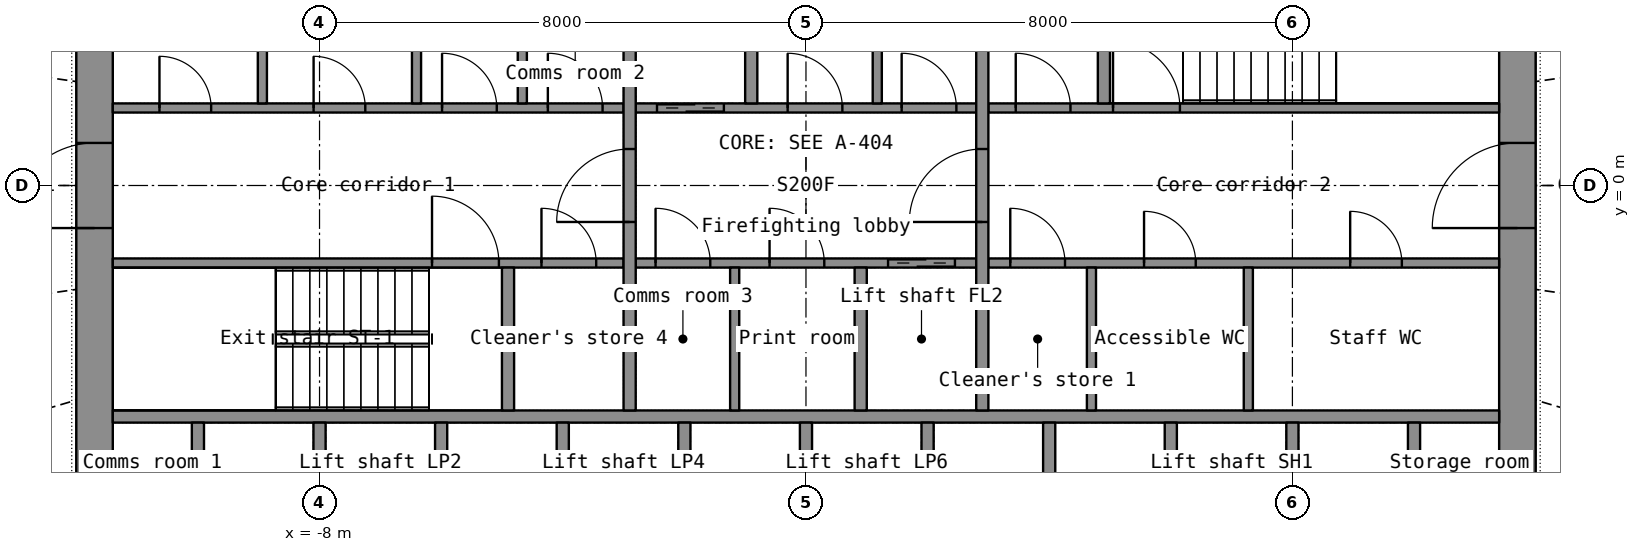
"""IFC4 building model, lengths in metres.
Left out: names, types, materials, properties, quantities, classifications, styles, units other than length and angle.
Written with IfcOpenShell. Run it as: python <this file> out.ifc"""

import sys

from ifc_helpers import new_model, si_unit, direction, frame, frame_2d, origin, place, context, subcontext, project, spatial, rectangle, extrude, element, fill, save


model = new_model("IFC4")
c1 = context("Model", 3, precision=1e-05, world=origin(), true_north=direction((0.0, 1.0)))
c2 = subcontext(c1, "Body", "Model", "MODEL_VIEW")
j1 = project(units=[si_unit("LENGTHUNIT", "METRE"), si_unit("PLANEANGLEUNIT", "RADIAN")], contexts=[c1])
p1 = place(None, origin())
s1 = spatial("IfcSite", under=j1, at=p1, CompositionType="ELEMENT")
p2 = place(p1, origin())
s2 = spatial("IfcBuilding", under=s1, at=p2, CompositionType="ELEMENT")
p3 = place(p2, frame((0.0, 0.0, 13.5)))
s3 = spatial("IfcBuildingStorey", under=s2, at=p3, CompositionType="ELEMENT", Elevation=13.5)
p4 = place(p3, frame((-11.7, -7.2, 0.0), z_axis=(0.0, 0.0, 1.0), x_axis=(0.0, 1.0, 0.0)))
e1 = element("IfcWall", 1, at=p4, inside=s3, PredefinedType="SHEAR", context=c2, shape_type="SweptSolid", body=[
    extrude(rectangle(XDim=14.4, YDim=0.6, at=frame_2d((7.2, 0.0))), origin(), (0.0, 0.0, 1.0), 6.1),
])
p5 = place(p4, frame((6.5, 0.0, 0.0)))
e2 = element("IfcOpeningElement", 2, at=p5, cuts=e1, PredefinedType="OPENING", context=c2, shape_type="SweptSolid", body=[
    extrude(rectangle(XDim=1.4, YDim=2.2, at=frame_2d((0.7, 1.1))), frame((0.0, 0.31, 0.0), z_axis=(0.0, -1.0, 0.0), x_axis=(1.0, 0.0, 0.0)), (0.0, 0.0, 1.0), 0.62),
])
p6 = place(p3, frame((11.7, -7.2, 0.0), z_axis=(0.0, 0.0, 1.0), x_axis=(0.0, 1.0, 0.0)))
e3 = element("IfcWall", 3, at=p6, inside=s3, PredefinedType="SHEAR", context=c2, shape_type="SweptSolid", body=[
    extrude(rectangle(XDim=14.4, YDim=0.6, at=frame_2d((7.2, 0.0))), origin(), (0.0, 0.0, 1.0), 6.1),
])
p7 = place(p6, frame((6.5, 0.0, 0.0)))
e4 = element("IfcOpeningElement", 4, at=p7, cuts=e3, PredefinedType="OPENING", context=c2, shape_type="SweptSolid", body=[
    extrude(rectangle(XDim=1.4, YDim=2.2, at=frame_2d((0.7, 1.1))), frame((0.0, 0.31, 0.0), z_axis=(0.0, -1.0, 0.0), x_axis=(1.0, 0.0, 0.0)), (0.0, 0.0, 1.0), 0.62),
])
p8 = place(p3, frame((-11.4, -3.8, 0.0), z_axis=(0.0, 0.0, 1.0), x_axis=(1.0, 0.0, 0.0)))
e5 = element("IfcWall", 5, at=p8, inside=s3, PredefinedType="SHEAR", context=c2, shape_type="SweptSolid", body=[
    extrude(rectangle(XDim=22.8, YDim=0.2, at=frame_2d((11.4, 0.0))), origin(), (0.0, 0.0, 1.0), 6.1),
])
for number, where, z_axis, x_axis in (
    (6, (-10.0, -6.6, 0.0), (0.0, 0.0, 1.0), (0.0, 1.0, 0.0)),
    (7, (-8.0, -6.6, 0.0), (0.0, 0.0, 1.0), (0.0, 1.0, 0.0)),
    (8, (-6.0, -6.6, 0.0), (0.0, 0.0, 1.0), (0.0, 1.0, 0.0)),
    (9, (-4.0, -6.6, 0.0), (0.0, 0.0, 1.0), (0.0, 1.0, 0.0)),
    (10, (-2.0, -6.6, 0.0), (0.0, 0.0, 1.0), (0.0, 1.0, 0.0)),
    (11, (0.0, -6.6, 0.0), (0.0, 0.0, 1.0), (0.0, 1.0, 0.0)),
    (12, (2.0, -6.6, 0.0), (0.0, 0.0, 1.0), (0.0, 1.0, 0.0)),
    (13, (4.0, -6.6, 0.0), (0.0, 0.0, 1.0), (0.0, 1.0, 0.0)),
    (14, (6.0, -6.6, 0.0), (0.0, 0.0, 1.0), (0.0, 1.0, 0.0)),
    (15, (8.0, -6.6, 0.0), (0.0, 0.0, 1.0), (0.0, 1.0, 0.0)),
    (16, (10.0, -6.6, 0.0), (0.0, 0.0, 1.0), (0.0, 1.0, 0.0)),
):
    element("IfcWall", number, at=place(p3, frame(where, z_axis=z_axis, x_axis=x_axis)), inside=s3, PredefinedType="SHEAR", context=c2, shape_type="SweptSolid", body=[
        extrude(rectangle(XDim=2.7, YDim=0.2, at=frame_2d((1.35, 0.0))), origin(), (0.0, 0.0, 1.0), 6.1),
    ])
p9 = place(p3, frame((-11.4, -1.275, 0.0), z_axis=(0.0, 0.0, 1.0), x_axis=(1.0, 0.0, 0.0)))
e17 = element("IfcWall", 17, at=p9, inside=s3, PredefinedType="SHEAR", context=c2, shape_type="SweptSolid", body=[
    extrude(rectangle(XDim=8.4, YDim=0.15, at=frame_2d((4.2, 0.0))), origin(), (0.0, 0.0, 1.0), 6.1),
])
p10 = place(p9, frame((5.25, 0.0, 0.0)))
e18 = element("IfcOpeningElement", 18, at=p10, cuts=e17, PredefinedType="OPENING", context=c2, shape_type="SweptSolid", body=[
    extrude(rectangle(XDim=1.1, YDim=2.15, at=frame_2d((0.55, 1.075))), frame((0.0, 0.085, 0.0), z_axis=(0.0, -1.0, 0.0), x_axis=(1.0, 0.0, 0.0)), (0.0, 0.0, 1.0), 0.17),
])
p11 = place(p9, frame((7.05, 0.0, 0.0)))
e19 = element("IfcOpeningElement", 19, at=p11, cuts=e17, PredefinedType="OPENING", context=c2, shape_type="SweptSolid", body=[
    extrude(rectangle(XDim=0.9, YDim=2.1, at=frame_2d((0.45, 1.05))), frame((0.0, 0.085, 0.0), z_axis=(0.0, -1.0, 0.0), x_axis=(1.0, 0.0, 0.0)), (0.0, 0.0, 1.0), 0.17),
])
p12 = place(p3, frame((-2.8, -1.275, 0.0), z_axis=(0.0, 0.0, 1.0), x_axis=(1.0, 0.0, 0.0)))
e20 = element("IfcWall", 20, at=p12, inside=s3, PredefinedType="SHEAR", context=c2, shape_type="SweptSolid", body=[
    extrude(rectangle(XDim=5.6, YDim=0.15, at=frame_2d((2.8, 0.0))), origin(), (0.0, 0.0, 1.0), 6.1),
])
p13 = place(p12, frame((4.15, 0.0, 0.0)))
e21 = element("IfcOpeningElement", 21, at=p13, cuts=e20, PredefinedType="OPENING", context=c2, shape_type="SweptSolid", body=[
    extrude(rectangle(XDim=1.1, YDim=2.2, at=frame_2d((0.55, 1.1))), frame((0.0, 0.085, 0.0), z_axis=(0.0, -1.0, 0.0), x_axis=(1.0, 0.0, 0.0)), (0.0, 0.0, 1.0), 0.17),
])
p14 = place(p12, frame((0.326, 0.0, 0.0)))
e22 = element("IfcOpeningElement", 22, at=p14, cuts=e20, PredefinedType="OPENING", context=c2, shape_type="SweptSolid", body=[
    extrude(rectangle(XDim=0.9, YDim=2.1, at=frame_2d((0.45, 1.05))), frame((0.0, 0.085, 0.0), z_axis=(0.0, -1.0, 0.0), x_axis=(1.0, 0.0, 0.0)), (0.0, 0.0, 1.0), 0.17),
])
p15 = place(p12, frame((2.201, 0.0, 0.0)))
e23 = element("IfcOpeningElement", 23, at=p15, cuts=e20, PredefinedType="OPENING", context=c2, shape_type="SweptSolid", body=[
    extrude(rectangle(XDim=0.9, YDim=2.1, at=frame_2d((0.45, 1.05))), frame((0.0, 0.085, 0.0), z_axis=(0.0, -1.0, 0.0), x_axis=(1.0, 0.0, 0.0)), (0.0, 0.0, 1.0), 0.17),
])
p16 = place(p3, frame((3.0, -1.275, 0.0), z_axis=(0.0, 0.0, 1.0), x_axis=(1.0, 0.0, 0.0)))
e24 = element("IfcWall", 24, at=p16, inside=s3, PredefinedType="PARTITIONING", context=c2, shape_type="SweptSolid", body=[
    extrude(rectangle(XDim=8.4, YDim=0.15, at=frame_2d((4.2, 0.0))), origin(), (0.0, 0.0, 1.0), 6.1),
])
p17 = place(p16, frame((0.36, 0.0, 0.0)))
e25 = element("IfcOpeningElement", 25, at=p17, cuts=e24, PredefinedType="OPENING", context=c2, shape_type="SweptSolid", body=[
    extrude(rectangle(XDim=0.9, YDim=2.1, at=frame_2d((0.45, 1.05))), frame((0.0, 0.085, 0.0), z_axis=(0.0, -1.0, 0.0), x_axis=(1.0, 0.0, 0.0)), (0.0, 0.0, 1.0), 0.17),
])
p18 = place(p16, frame((2.56, 0.0, 0.0)))
e26 = element("IfcOpeningElement", 26, at=p18, cuts=e24, PredefinedType="OPENING", context=c2, shape_type="SweptSolid", body=[
    extrude(rectangle(XDim=0.85, YDim=2.1, at=frame_2d((0.425, 1.05))), frame((0.0, 0.085, 0.0), z_axis=(0.0, -1.0, 0.0), x_axis=(1.0, 0.0, 0.0)), (0.0, 0.0, 1.0), 0.17),
])
p19 = place(p16, frame((5.95, 0.0, 0.0)))
e27 = element("IfcOpeningElement", 27, at=p19, cuts=e24, PredefinedType="OPENING", context=c2, shape_type="SweptSolid", body=[
    extrude(rectangle(XDim=0.85, YDim=2.1, at=frame_2d((0.425, 1.05))), frame((0.0, 0.085, 0.0), z_axis=(0.0, -1.0, 0.0), x_axis=(1.0, 0.0, 0.0)), (0.0, 0.0, 1.0), 0.17),
])
p20 = place(p3, frame((-11.4, 1.275, 0.0), z_axis=(0.0, 0.0, 1.0), x_axis=(1.0, 0.0, 0.0)))
e28 = element("IfcWall", 28, at=p20, inside=s3, PredefinedType="PARTITIONING", context=c2, shape_type="SweptSolid", body=[
    extrude(rectangle(XDim=8.4, YDim=0.15, at=frame_2d((4.2, 0.0))), origin(), (0.0, 0.0, 1.0), 6.1),
])
p21 = place(p20, frame((0.768, 0.0, 0.0)))
e29 = element("IfcOpeningElement", 29, at=p21, cuts=e28, PredefinedType="OPENING", context=c2, shape_type="SweptSolid", body=[
    extrude(rectangle(XDim=0.85, YDim=2.1, at=frame_2d((0.425, 1.05))), frame((0.0, 0.085, 0.0), z_axis=(0.0, -1.0, 0.0), x_axis=(1.0, 0.0, 0.0)), (0.0, 0.0, 1.0), 0.17),
])
p22 = place(p20, frame((3.302, 0.0, 0.0)))
e30 = element("IfcOpeningElement", 30, at=p22, cuts=e28, PredefinedType="OPENING", context=c2, shape_type="SweptSolid", body=[
    extrude(rectangle(XDim=0.85, YDim=2.1, at=frame_2d((0.425, 1.05))), frame((0.0, 0.085, 0.0), z_axis=(0.0, -1.0, 0.0), x_axis=(1.0, 0.0, 0.0)), (0.0, 0.0, 1.0), 0.17),
])
p23 = place(p20, frame((5.415, 0.0, 0.0)))
e31 = element("IfcOpeningElement", 31, at=p23, cuts=e28, PredefinedType="OPENING", context=c2, shape_type="SweptSolid", body=[
    extrude(rectangle(XDim=0.9, YDim=2.1, at=frame_2d((0.45, 1.05))), frame((0.0, 0.085, 0.0), z_axis=(0.0, -1.0, 0.0), x_axis=(1.0, 0.0, 0.0)), (0.0, 0.0, 1.0), 0.17),
])
p24 = place(p20, frame((7.155, 0.0, 0.0)))
e32 = element("IfcOpeningElement", 32, at=p24, cuts=e28, PredefinedType="OPENING", context=c2, shape_type="SweptSolid", body=[
    extrude(rectangle(XDim=0.9, YDim=2.1, at=frame_2d((0.45, 1.05))), frame((0.0, 0.085, 0.0), z_axis=(0.0, -1.0, 0.0), x_axis=(1.0, 0.0, 0.0)), (0.0, 0.0, 1.0), 0.17),
])
p25 = place(p3, frame((-2.8, 1.275, 0.0), z_axis=(0.0, 0.0, 1.0), x_axis=(1.0, 0.0, 0.0)))
e33 = element("IfcWall", 33, at=p25, inside=s3, PredefinedType="SHEAR", context=c2, shape_type="SweptSolid", body=[
    extrude(rectangle(XDim=5.6, YDim=0.15, at=frame_2d((2.8, 0.0))), origin(), (0.0, 0.0, 1.0), 6.1),
])
p26 = place(p25, frame((0.35, 0.0, 0.0)))
e34 = element("IfcOpeningElement", 34, at=p26, cuts=e33, PredefinedType="OPENING", context=c2, shape_type="SweptSolid", body=[
    extrude(rectangle(XDim=1.1, YDim=2.2, at=frame_2d((0.55, 1.1))), frame((0.0, 0.085, 0.0), z_axis=(0.0, -1.0, 0.0), x_axis=(1.0, 0.0, 0.0)), (0.0, 0.0, 1.0), 0.17),
])
p27 = place(p25, frame((2.499, 0.0, 0.0)))
e35 = element("IfcOpeningElement", 35, at=p27, cuts=e33, PredefinedType="OPENING", context=c2, shape_type="SweptSolid", body=[
    extrude(rectangle(XDim=0.9, YDim=2.1, at=frame_2d((0.45, 1.05))), frame((0.0, 0.085, 0.0), z_axis=(0.0, -1.0, 0.0), x_axis=(1.0, 0.0, 0.0)), (0.0, 0.0, 1.0), 0.17),
])
p28 = place(p25, frame((4.374, 0.0, 0.0)))
e36 = element("IfcOpeningElement", 36, at=p28, cuts=e33, PredefinedType="OPENING", context=c2, shape_type="SweptSolid", body=[
    extrude(rectangle(XDim=0.9, YDim=2.1, at=frame_2d((0.45, 1.05))), frame((0.0, 0.085, 0.0), z_axis=(0.0, -1.0, 0.0), x_axis=(1.0, 0.0, 0.0)), (0.0, 0.0, 1.0), 0.17),
])
p29 = place(p3, frame((3.0, 1.275, 0.0), z_axis=(0.0, 0.0, 1.0), x_axis=(1.0, 0.0, 0.0)))
e37 = element("IfcWall", 37, at=p29, inside=s3, PredefinedType="SHEAR", context=c2, shape_type="SweptSolid", body=[
    extrude(rectangle(XDim=8.4, YDim=0.15, at=frame_2d((4.2, 0.0))), origin(), (0.0, 0.0, 1.0), 6.1),
])
p30 = place(p29, frame((2.05, 0.0, 0.0)))
e38 = element("IfcOpeningElement", 38, at=p30, cuts=e37, PredefinedType="OPENING", context=c2, shape_type="SweptSolid", body=[
    extrude(rectangle(XDim=1.1, YDim=2.15, at=frame_2d((0.55, 1.075))), frame((0.0, 0.085, 0.0), z_axis=(0.0, -1.0, 0.0), x_axis=(1.0, 0.0, 0.0)), (0.0, 0.0, 1.0), 0.17),
])
p31 = place(p29, frame((0.45, 0.0, 0.0)))
e39 = element("IfcOpeningElement", 39, at=p31, cuts=e37, PredefinedType="OPENING", context=c2, shape_type="SweptSolid", body=[
    extrude(rectangle(XDim=0.9, YDim=2.1, at=frame_2d((0.45, 1.05))), frame((0.0, 0.085, 0.0), z_axis=(0.0, -1.0, 0.0), x_axis=(1.0, 0.0, 0.0)), (0.0, 0.0, 1.0), 0.17),
])
p32 = place(p3, frame((-2.9, -3.7, 0.0), z_axis=(0.0, 0.0, 1.0), x_axis=(0.0, 1.0, 0.0)))
e40 = element("IfcWall", 40, at=p32, inside=s3, PredefinedType="SHEAR", context=c2, shape_type="SweptSolid", body=[
    extrude(rectangle(XDim=7.4, YDim=0.2, at=frame_2d((3.7, 0.0))), origin(), (0.0, 0.0, 1.0), 6.1),
])
p33 = place(p32, frame((3.1, 0.0, 0.0)))
e41 = element("IfcOpeningElement", 41, at=p33, cuts=e40, PredefinedType="OPENING", context=c2, shape_type="SweptSolid", body=[
    extrude(rectangle(XDim=1.2, YDim=2.2, at=frame_2d((0.6, 1.1))), frame((0.0, 0.11, 0.0), z_axis=(0.0, -1.0, 0.0), x_axis=(1.0, 0.0, 0.0)), (0.0, 0.0, 1.0), 0.22),
])
p34 = place(p3, frame((2.9, -3.7, 0.0), z_axis=(0.0, 0.0, 1.0), x_axis=(0.0, 1.0, 0.0)))
e42 = element("IfcWall", 42, at=p34, inside=s3, PredefinedType="SHEAR", context=c2, shape_type="SweptSolid", body=[
    extrude(rectangle(XDim=7.4, YDim=0.2, at=frame_2d((3.7, 0.0))), origin(), (0.0, 0.0, 1.0), 6.1),
])
p35 = place(p34, frame((3.1, 0.0, 0.0)))
e43 = element("IfcOpeningElement", 43, at=p35, cuts=e42, PredefinedType="OPENING", context=c2, shape_type="SweptSolid", body=[
    extrude(rectangle(XDim=1.2, YDim=2.2, at=frame_2d((0.6, 1.1))), frame((0.0, 0.11, 0.0), z_axis=(0.0, -1.0, 0.0), x_axis=(1.0, 0.0, 0.0)), (0.0, 0.0, 1.0), 0.22),
])
for number, where, z_axis, x_axis in (
    (44, (-0.9, 1.35, 0.0), (0.0, 0.0, 1.0), (0.0, 1.0, 0.0)),
    (45, (0.9, -3.7, 0.0), (0.0, 0.0, 1.0), (0.0, 1.0, 0.0)),
    (46, (-4.9, -3.7, 0.0), (0.0, 0.0, 1.0), (0.0, 1.0, 0.0)),
    (47, (4.9, 1.35, 0.0), (0.0, 0.0, 1.0), (0.0, 1.0, 0.0)),
):
    element("IfcWall", number, at=place(p3, frame(where, z_axis=z_axis, x_axis=x_axis)), inside=s3, PredefinedType="SHEAR", context=c2, shape_type="SweptSolid", body=[
        extrude(rectangle(XDim=2.35, YDim=0.2, at=frame_2d((1.175, 0.0))), origin(), (0.0, 0.0, 1.0), 6.1),
    ])
for number, where, z_axis, x_axis in (
    (48, (-8.94, 1.35, 0.0), (0.0, 0.0, 1.0), (0.0, 1.0, 0.0)),
    (49, (-6.405, 1.35, 0.0), (0.0, 0.0, 1.0), (0.0, 1.0, 0.0)),
    (50, (-4.665, 1.35, 0.0), (0.0, 0.0, 1.0), (0.0, 1.0, 0.0)),
    (51, (4.695, -3.7, 0.0), (0.0, 0.0, 1.0), (0.0, 1.0, 0.0)),
    (52, (7.275, -3.7, 0.0), (0.0, 0.0, 1.0), (0.0, 1.0, 0.0)),
    (53, (1.173, 1.35, 0.0), (0.0, 0.0, 1.0), (0.0, 1.0, 0.0)),
    (54, (-1.173, -3.7, 0.0), (0.0, 0.0, 1.0), (0.0, 1.0, 0.0)),
):
    element("IfcWall", number, at=place(p3, frame(where, z_axis=z_axis, x_axis=x_axis)), inside=s3, PredefinedType="PARTITIONING", context=c2, shape_type="SweptSolid", body=[
        extrude(rectangle(XDim=2.35, YDim=0.15, at=frame_2d((1.175, 0.0))), origin(), (0.0, 0.0, 1.0), 6.1),
    ])
p36 = place(p5, origin())
e55 = element("IfcDoor", 55, at=p36, inside=s3, OperationType="DOUBLE_DOOR_SINGLE_SWING", PredefinedType="DOOR", context=c2, shape_type="SweptSolid", body=[
    extrude(rectangle(XDim=1.4, YDim=2.2, at=frame_2d((0.7, 1.1))), frame((0.0, 0.025, 0.0), z_axis=(0.0, -1.0, 0.0), x_axis=(1.0, 0.0, 0.0)), (0.0, 0.0, 1.0), 0.05),
])
fill(e2, e55)
p37 = place(p7, origin())
e56 = element("IfcDoor", 56, at=p37, inside=s3, OperationType="DOUBLE_DOOR_SINGLE_SWING", PredefinedType="DOOR", context=c2, shape_type="SweptSolid", body=[
    extrude(rectangle(XDim=1.4, YDim=2.2, at=frame_2d((0.7, 1.1))), frame((0.0, 0.025, 0.0), z_axis=(0.0, -1.0, 0.0), x_axis=(1.0, 0.0, 0.0)), (0.0, 0.0, 1.0), 0.05),
])
fill(e4, e56)
p38 = place(p33, origin())
e57 = element("IfcDoor", 57, at=p38, inside=s3, OperationType="SINGLE_SWING_LEFT", PredefinedType="DOOR", context=c2, shape_type="SweptSolid", body=[
    extrude(rectangle(XDim=1.2, YDim=2.2, at=frame_2d((0.6, 1.1))), frame((0.0, 0.025, 0.0), z_axis=(0.0, -1.0, 0.0), x_axis=(1.0, 0.0, 0.0)), (0.0, 0.0, 1.0), 0.05),
])
fill(e41, e57)
p39 = place(p35, origin())
e58 = element("IfcDoor", 58, at=p39, inside=s3, OperationType="SINGLE_SWING_LEFT", PredefinedType="DOOR", context=c2, shape_type="SweptSolid", body=[
    extrude(rectangle(XDim=1.2, YDim=2.2, at=frame_2d((0.6, 1.1))), frame((0.0, 0.025, 0.0), z_axis=(0.0, -1.0, 0.0), x_axis=(1.0, 0.0, 0.0)), (0.0, 0.0, 1.0), 0.05),
])
fill(e43, e58)
p40 = place(p26, origin())
e59 = element("IfcDoor", 59, at=p40, inside=s3, OperationType="DOUBLE_DOOR_SLIDING", PredefinedType="DOOR", context=c2, shape_type="SweptSolid", body=[
    extrude(rectangle(XDim=1.1, YDim=2.2, at=frame_2d((0.55, 1.1))), frame((0.0, 0.025, 0.0), z_axis=(0.0, -1.0, 0.0), x_axis=(1.0, 0.0, 0.0)), (0.0, 0.0, 1.0), 0.05),
])
fill(e34, e59)
p41 = place(p13, origin())
e60 = element("IfcDoor", 60, at=p41, inside=s3, OperationType="DOUBLE_DOOR_SLIDING", PredefinedType="DOOR", context=c2, shape_type="SweptSolid", body=[
    extrude(rectangle(XDim=1.1, YDim=2.2, at=frame_2d((0.55, 1.1))), frame((0.0, 0.025, 0.0), z_axis=(0.0, -1.0, 0.0), x_axis=(1.0, 0.0, 0.0)), (0.0, 0.0, 1.0), 0.05),
])
fill(e21, e60)
p42 = place(p10, origin())
e61 = element("IfcDoor", 61, at=p42, inside=s3, OperationType="SINGLE_SWING_LEFT", PredefinedType="DOOR", context=c2, shape_type="SweptSolid", body=[
    extrude(rectangle(XDim=1.1, YDim=2.15, at=frame_2d((0.55, 1.075))), frame((0.0, 0.025, 0.0), z_axis=(0.0, -1.0, 0.0), x_axis=(1.0, 0.0, 0.0)), (0.0, 0.0, 1.0), 0.05),
])
fill(e18, e61)
p43 = place(p30, origin())
e62 = element("IfcDoor", 62, at=p43, inside=s3, OperationType="SINGLE_SWING_LEFT", PredefinedType="DOOR", context=c2, shape_type="SweptSolid", body=[
    extrude(rectangle(XDim=1.1, YDim=2.15, at=frame_2d((0.55, 1.075))), frame((0.0, 0.025, 0.0), z_axis=(0.0, -1.0, 0.0), x_axis=(1.0, 0.0, 0.0)), (0.0, 0.0, 1.0), 0.05),
])
fill(e38, e62)
p44 = place(p21, origin())
e63 = element("IfcDoor", 63, at=p44, inside=s3, OperationType="SINGLE_SWING_LEFT", PredefinedType="DOOR", context=c2, shape_type="SweptSolid", body=[
    extrude(rectangle(XDim=0.85, YDim=2.1, at=frame_2d((0.425, 1.05))), frame((0.0, 0.025, 0.0), z_axis=(0.0, -1.0, 0.0), x_axis=(1.0, 0.0, 0.0)), (0.0, 0.0, 1.0), 0.05),
])
fill(e29, e63)
p45 = place(p22, origin())
e64 = element("IfcDoor", 64, at=p45, inside=s3, OperationType="SINGLE_SWING_LEFT", PredefinedType="DOOR", context=c2, shape_type="SweptSolid", body=[
    extrude(rectangle(XDim=0.85, YDim=2.1, at=frame_2d((0.425, 1.05))), frame((0.0, 0.025, 0.0), z_axis=(0.0, -1.0, 0.0), x_axis=(1.0, 0.0, 0.0)), (0.0, 0.0, 1.0), 0.05),
])
fill(e30, e64)
p46 = place(p23, origin())
e65 = element("IfcDoor", 65, at=p46, inside=s3, OperationType="SINGLE_SWING_LEFT", PredefinedType="DOOR", context=c2, shape_type="SweptSolid", body=[
    extrude(rectangle(XDim=0.9, YDim=2.1, at=frame_2d((0.45, 1.05))), frame((0.0, 0.025, 0.0), z_axis=(0.0, -1.0, 0.0), x_axis=(1.0, 0.0, 0.0)), (0.0, 0.0, 1.0), 0.05),
])
fill(e31, e65)
p47 = place(p24, origin())
e66 = element("IfcDoor", 66, at=p47, inside=s3, OperationType="SINGLE_SWING_LEFT", PredefinedType="DOOR", context=c2, shape_type="SweptSolid", body=[
    extrude(rectangle(XDim=0.9, YDim=2.1, at=frame_2d((0.45, 1.05))), frame((0.0, 0.025, 0.0), z_axis=(0.0, -1.0, 0.0), x_axis=(1.0, 0.0, 0.0)), (0.0, 0.0, 1.0), 0.05),
])
fill(e32, e66)
p48 = place(p17, origin())
e67 = element("IfcDoor", 67, at=p48, inside=s3, OperationType="SINGLE_SWING_LEFT", PredefinedType="DOOR", context=c2, shape_type="SweptSolid", body=[
    extrude(rectangle(XDim=0.9, YDim=2.1, at=frame_2d((0.45, 1.05))), frame((0.0, 0.025, 0.0), z_axis=(0.0, -1.0, 0.0), x_axis=(1.0, 0.0, 0.0)), (0.0, 0.0, 1.0), 0.05),
])
fill(e25, e67)
p49 = place(p18, origin())
e68 = element("IfcDoor", 68, at=p49, inside=s3, OperationType="SINGLE_SWING_LEFT", PredefinedType="DOOR", context=c2, shape_type="SweptSolid", body=[
    extrude(rectangle(XDim=0.85, YDim=2.1, at=frame_2d((0.425, 1.05))), frame((0.0, 0.025, 0.0), z_axis=(0.0, -1.0, 0.0), x_axis=(1.0, 0.0, 0.0)), (0.0, 0.0, 1.0), 0.05),
])
fill(e26, e68)
p50 = place(p19, origin())
e69 = element("IfcDoor", 69, at=p50, inside=s3, OperationType="SINGLE_SWING_LEFT", PredefinedType="DOOR", context=c2, shape_type="SweptSolid", body=[
    extrude(rectangle(XDim=0.85, YDim=2.1, at=frame_2d((0.425, 1.05))), frame((0.0, 0.025, 0.0), z_axis=(0.0, -1.0, 0.0), x_axis=(1.0, 0.0, 0.0)), (0.0, 0.0, 1.0), 0.05),
])
fill(e27, e69)
p51 = place(p27, origin())
e70 = element("IfcDoor", 70, at=p51, inside=s3, OperationType="SINGLE_SWING_LEFT", PredefinedType="DOOR", context=c2, shape_type="SweptSolid", body=[
    extrude(rectangle(XDim=0.9, YDim=2.1, at=frame_2d((0.45, 1.05))), frame((0.0, 0.025, 0.0), z_axis=(0.0, -1.0, 0.0), x_axis=(1.0, 0.0, 0.0)), (0.0, 0.0, 1.0), 0.05),
])
fill(e35, e70)
p52 = place(p28, origin())
e71 = element("IfcDoor", 71, at=p52, inside=s3, OperationType="SINGLE_SWING_LEFT", PredefinedType="DOOR", context=c2, shape_type="SweptSolid", body=[
    extrude(rectangle(XDim=0.9, YDim=2.1, at=frame_2d((0.45, 1.05))), frame((0.0, 0.025, 0.0), z_axis=(0.0, -1.0, 0.0), x_axis=(1.0, 0.0, 0.0)), (0.0, 0.0, 1.0), 0.05),
])
fill(e36, e71)
p53 = place(p14, origin())
e72 = element("IfcDoor", 72, at=p53, inside=s3, OperationType="SINGLE_SWING_LEFT", PredefinedType="DOOR", context=c2, shape_type="SweptSolid", body=[
    extrude(rectangle(XDim=0.9, YDim=2.1, at=frame_2d((0.45, 1.05))), frame((0.0, 0.025, 0.0), z_axis=(0.0, -1.0, 0.0), x_axis=(1.0, 0.0, 0.0)), (0.0, 0.0, 1.0), 0.05),
])
fill(e22, e72)
p54 = place(p15, origin())
e73 = element("IfcDoor", 73, at=p54, inside=s3, OperationType="SINGLE_SWING_LEFT", PredefinedType="DOOR", context=c2, shape_type="SweptSolid", body=[
    extrude(rectangle(XDim=0.9, YDim=2.1, at=frame_2d((0.45, 1.05))), frame((0.0, 0.025, 0.0), z_axis=(0.0, -1.0, 0.0), x_axis=(1.0, 0.0, 0.0)), (0.0, 0.0, 1.0), 0.05),
])
fill(e23, e73)
p55 = place(p31, origin())
e74 = element("IfcDoor", 74, at=p55, inside=s3, OperationType="SINGLE_SWING_LEFT", PredefinedType="DOOR", context=c2, shape_type="SweptSolid", body=[
    extrude(rectangle(XDim=0.9, YDim=2.1, at=frame_2d((0.45, 1.05))), frame((0.0, 0.025, 0.0), z_axis=(0.0, -1.0, 0.0), x_axis=(1.0, 0.0, 0.0)), (0.0, 0.0, 1.0), 0.05),
])
fill(e39, e74)
p56 = place(p11, origin())
e75 = element("IfcDoor", 75, at=p56, inside=s3, OperationType="SINGLE_SWING_LEFT", PredefinedType="DOOR", context=c2, shape_type="SweptSolid", body=[
    extrude(rectangle(XDim=0.9, YDim=2.1, at=frame_2d((0.45, 1.05))), frame((0.0, 0.025, 0.0), z_axis=(0.0, -1.0, 0.0), x_axis=(1.0, 0.0, 0.0)), (0.0, 0.0, 1.0), 0.05),
])
fill(e19, e75)
save(model, sys.argv[1])
